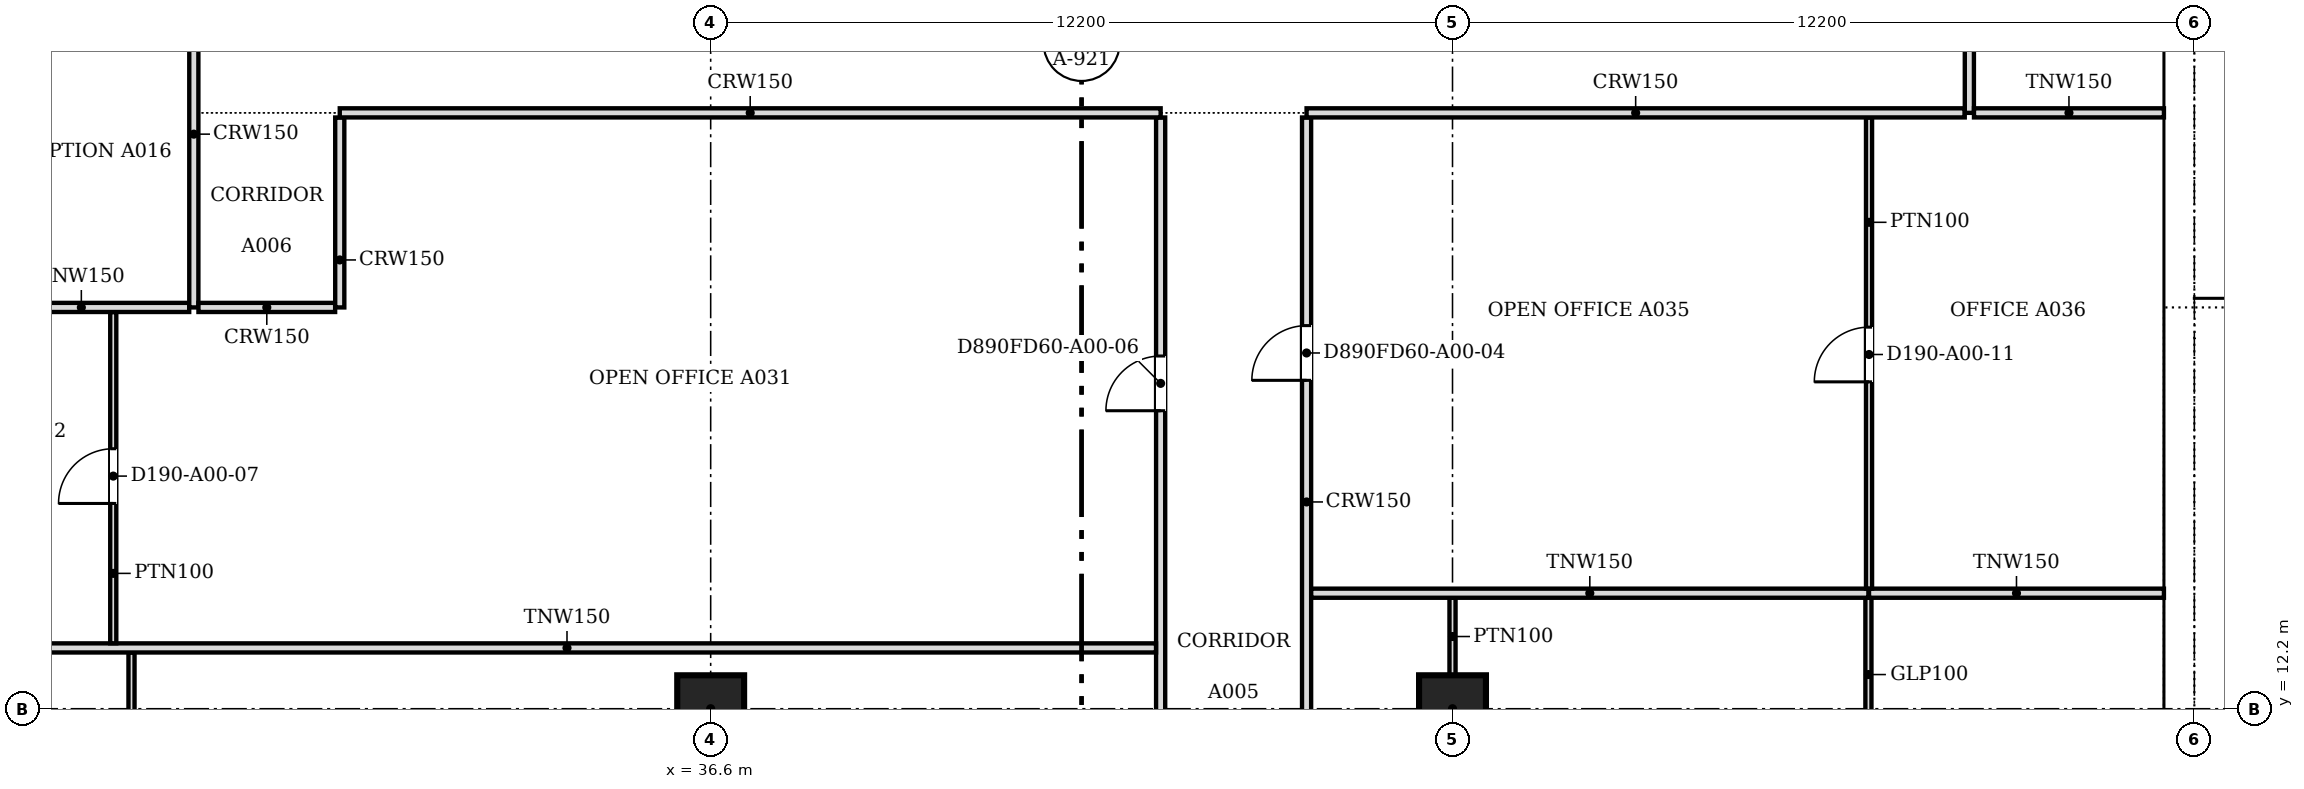
"""IFC4 building model, lengths in metres.
Left out: names, types, materials, properties, quantities, classifications, styles, units other than length and angle.
Written with IfcOpenShell. Run it as: python <this file> out.ifc"""

import sys

from ifc_helpers import new_model, si_unit, direction, frame, frame_2d, origin, origin_2d, place, context, subcontext, project, spatial, polyline, rectangle, outline, extrude, faceted_brep, source, transform, mapped, element, fill, save


model = new_model("IFC4")
c1 = context("Model", 3, precision=1e-05, world=origin(), true_north=direction((0.0, 1.0)))
c2 = subcontext(c1, "Body", "Model", "MODEL_VIEW")
j1 = project(units=[si_unit("LENGTHUNIT", "METRE"), si_unit("PLANEANGLEUNIT", "RADIAN")], contexts=[c1])
p1 = place(None, origin())
s1 = spatial("IfcSite", under=j1, at=p1, CompositionType="ELEMENT")
p2 = place(p1, origin())
s2 = spatial("IfcBuilding", under=s1, at=p2, CompositionType="ELEMENT")
p3 = place(p2, frame((0.0, 0.0, 16.8)))
s3 = spatial("IfcBuildingStorey", under=s2, at=p3, CompositionType="ELEMENT", Elevation=16.8)
for number, where, z_axis, x_axis in (
    (1, (36.6, 12.2, 0.0), (0.0, 0.0, 1.0), (1.0, 0.0, 0.0)),
    (2, (48.8, 12.2, 0.0), (0.0, 0.0, 1.0), (1.0, 0.0, 0.0)),
):
    element("IfcColumn", number, at=place(p3, frame(where, z_axis=z_axis, x_axis=x_axis)), inside=s3, PredefinedType="COLUMN", context=c2, shape_type="SweptSolid", body=[
        extrude(rectangle(XDim=1.1, YDim=1.1, at=origin_2d()), origin(), (0.0, 0.0, 1.0), 4.3),
    ])
m1 = source(origin(), c2, "Body", "SweptSolid", [
    extrude(outline(polyline([(6.1, 0.0), (3.05, 4.5), (0.0, 0.0), (6.1, 0.0)])), frame((0.0, 0.25, 0.0), z_axis=(0.0, -1.0, 0.0), x_axis=(1.0, 0.0, 0.0)), (0.0, 0.0, 1.0), 0.5),
])
p4 = place(p3, frame((60.75, 12.2, 0.0), z_axis=(0.0, 0.0, 1.0), x_axis=(0.0, 1.0, 0.0)))
e3 = element("IfcWall", 3, at=p4, inside=s3, PredefinedType="SOLIDWALL", context=c2, shape_type="MappedRepresentation", body=[
    mapped(m1, transform((0.0, 0.0, 0.0), scale=1.0)),
])
m2 = source(origin(), c2, "Body", "SweptSolid", [
    extrude(outline(polyline([(5.629, 0.25), (3.05, 4.054), (0.471, 0.25), (5.629, 0.25)])), frame((0.0, 0.26, 0.0), z_axis=(0.0, -1.0, 0.0), x_axis=(1.0, 0.0, 0.0)), (0.0, 0.0, 1.0), 0.52),
])
p5 = place(p4, origin())
e4 = element("IfcOpeningElement", 4, at=p5, cuts=e3, PredefinedType="OPENING", context=c2, shape_type="MappedRepresentation", body=[
    mapped(m2, transform((0.0, 0.0, 0.0), scale=1.0)),
])
m3 = source(origin(), c2, "Body", "Brep", [
    faceted_brep([(6.1, -0.25, 0.0), (3.05, -0.25, 4.5), (0.0, -0.25, 0.0), (6.1, -0.25, 0.0), (0.0, 0.25, 0.0), (3.05, 0.25, 4.5), (6.1, 0.25, 0.0), (6.1, 0.25, 0.0)], [[[0, 1, 2, 3]], [[4, 5, 6, 7]], [[6, 5, 1, 0]], [[5, 4, 2, 1]], [[4, 7, 3, 2]], [[3, 7, 6, 0]]]),
])
p6 = place(p3, frame((60.75, 18.3, 0.0), z_axis=(0.0, 0.0, 1.0), x_axis=(0.0, 1.0, 0.0)))
e5 = element("IfcWall", 5, at=p6, inside=s3, PredefinedType="SOLIDWALL", context=c2, shape_type="MappedRepresentation", body=[
    mapped(m3, transform((0.0, 0.0, 0.0), scale=1.0)),
])
p7 = place(p6, origin())
e6 = element("IfcOpeningElement", 6, at=p7, cuts=e5, PredefinedType="OPENING", context=c2, shape_type="MappedRepresentation", body=[
    mapped(m2, transform((0.0, 0.0, 0.0), scale=1.0)),
])
p8 = place(p2, frame((0.0, 0.0, 21.3)))
s4 = spatial("IfcBuildingStorey", under=s2, at=p8, CompositionType="ELEMENT", Elevation=21.3)
m4 = source(origin(), c2, "Body", "SweptSolid", [
    extrude(outline(polyline([(3.05, 0.0), (6.1, 4.5), (3.05, 9.0), (0.0, 4.5), (3.05, 0.0)])), frame((0.0, 0.25, 0.0), z_axis=(0.0, -1.0, 0.0), x_axis=(1.0, 0.0, 0.0)), (0.0, 0.0, 1.0), 0.5),
])
p9 = place(p8, frame((60.75, 9.15, -4.5), z_axis=(0.0, 0.0, 1.0), x_axis=(0.0, 1.0, 0.0)))
e7 = element("IfcWall", 7, at=p9, inside=s4, PredefinedType="SOLIDWALL", context=c2, shape_type="MappedRepresentation", body=[
    mapped(m4, transform((0.0, 0.0, 0.0), scale=1.0)),
])
m5 = source(origin(), c2, "Body", "SweptSolid", [
    extrude(outline(polyline([(3.05, 0.446), (5.798, 4.5), (3.05, 8.554), (0.302, 4.5), (3.05, 0.446)])), frame((0.0, 0.26, 0.0), z_axis=(0.0, -1.0, 0.0), x_axis=(1.0, 0.0, 0.0)), (0.0, 0.0, 1.0), 0.52),
])
p10 = place(p9, origin())
e8 = element("IfcOpeningElement", 8, at=p10, cuts=e7, PredefinedType="OPENING", context=c2, shape_type="MappedRepresentation", body=[
    mapped(m5, transform((0.0, 0.0, 0.0), scale=1.0)),
])
p11 = place(p8, frame((60.75, 15.25, -4.5), z_axis=(0.0, 0.0, 1.0), x_axis=(0.0, 1.0, 0.0)))
e9 = element("IfcWall", 9, at=p11, inside=s4, PredefinedType="SOLIDWALL", context=c2, shape_type="MappedRepresentation", body=[
    mapped(m4, transform((0.0, 0.0, 0.0), scale=1.0)),
])
p12 = place(p11, origin())
e10 = element("IfcOpeningElement", 10, at=p12, cuts=e9, PredefinedType="OPENING", context=c2, shape_type="MappedRepresentation", body=[
    mapped(m5, transform((0.0, 0.0, 0.0), scale=1.0)),
])
m6 = source(origin(), c2, "Body", "Brep", [
    faceted_brep([(3.05, -0.25, 0.0), (6.1, -0.25, 4.5), (6.1, -0.25, 4.5), (3.05, -0.25, 9.0), (0.0, -0.25, 4.5), (0.0, 0.25, 4.5), (3.05, 0.25, 9.0), (6.1, 0.25, 4.5), (6.1, 0.25, 4.5), (3.05, 0.25, 0.0)], [[[0, 1, 2, 3, 4]], [[5, 6, 7, 8, 9]], [[9, 8, 1, 0]], [[7, 6, 3, 2]], [[6, 5, 4, 3]], [[5, 9, 0, 4]], [[1, 8, 7, 2]]]),
])
p13 = place(p8, frame((60.75, 21.35, -4.5), z_axis=(0.0, 0.0, 1.0), x_axis=(0.0, 1.0, 0.0)))
e11 = element("IfcWall", 11, at=p13, inside=s4, PredefinedType="SOLIDWALL", context=c2, shape_type="MappedRepresentation", body=[
    mapped(m6, transform((0.0, 0.0, 0.0), scale=1.0)),
])
p14 = place(p13, origin())
e12 = element("IfcOpeningElement", 12, at=p14, cuts=e11, PredefinedType="OPENING", context=c2, shape_type="MappedRepresentation", body=[
    mapped(m5, transform((0.0, 0.0, 0.0), scale=1.0)),
])
p15 = place(p3, frame((44.0, 0.5, 0.0), z_axis=(0.0, 0.0, 1.0), x_axis=(0.0, 1.0, 0.0)))
e13 = element("IfcWall", 13, at=p15, inside=s3, PredefinedType="PARTITIONING", context=c2, shape_type="SweptSolid", body=[
    extrude(rectangle(XDim=21.424, YDim=0.15, at=frame_2d((10.712, 0.0))), origin(), (0.0, 0.0, 1.0), 3.415),
])
m7 = source(origin(), c2, "Body", "SweptSolid", [
    extrude(rectangle(XDim=0.9, YDim=2.1, at=frame_2d((0.45, 1.05))), frame((0.0, 0.085, 0.0), z_axis=(0.0, -1.0, 0.0), x_axis=(1.0, 0.0, 0.0)), (0.0, 0.0, 1.0), 0.17),
])
p16 = place(p15, frame((16.601, 0.0, 0.0)))
e14 = element("IfcOpeningElement", 14, at=p16, cuts=e13, PredefinedType="OPENING", context=c2, shape_type="MappedRepresentation", body=[
    mapped(m7, transform((0.0, 0.0, 0.0), scale=1.0)),
])
p17 = place(p15, frame((7.7, 0.0, 0.0)))
e15 = element("IfcOpeningElement", 15, at=p17, cuts=e13, PredefinedType="OPENING", context=c2, shape_type="MappedRepresentation", body=[
    mapped(m7, transform((0.0, 0.0, 0.0), scale=1.0)),
])
p18 = place(p3, frame((27.075, 4.2, 0.0), z_axis=(0.0, 0.0, 1.0), x_axis=(0.0, 1.0, 0.0)))
e16 = element("IfcWall", 16, at=p18, inside=s3, PredefinedType="PARTITIONING", context=c2, shape_type="SweptSolid", body=[
    extrude(rectangle(XDim=8.924, YDim=0.1, at=frame_2d((4.462, 0.0))), origin(), (0.0, 0.0, 1.0), 3.415),
])
m8 = source(origin(), c2, "Body", "SweptSolid", [
    extrude(rectangle(XDim=0.9, YDim=2.1, at=frame_2d((0.45, 1.05))), frame((0.0, 0.06, 0.0), z_axis=(0.0, -1.0, 0.0), x_axis=(1.0, 0.0, 0.0)), (0.0, 0.0, 1.0), 0.12),
])
p19 = place(p18, frame((6.148, 0.0, 0.0)))
e17 = element("IfcOpeningElement", 17, at=p19, cuts=e16, PredefinedType="OPENING", context=c2, shape_type="MappedRepresentation", body=[
    mapped(m8, transform((0.0, 0.0, 0.0), scale=1.0)),
])
p20 = place(p18, frame((1.7, 0.0, 0.0)))
e18 = element("IfcOpeningElement", 18, at=p20, cuts=e16, PredefinedType="OPENING", context=c2, shape_type="MappedRepresentation", body=[
    mapped(m8, transform((0.0, 0.0, 0.0), scale=1.0)),
])
p21 = place(p3, frame((46.4, 21.924, 0.0), z_axis=(0.0, 0.0, 1.0), x_axis=(0.0, -1.0, 0.0)))
e19 = element("IfcWall", 19, at=p21, inside=s3, PredefinedType="PARTITIONING", context=c2, shape_type="SweptSolid", body=[
    extrude(rectangle(XDim=17.724, YDim=0.15, at=frame_2d((8.862, 0.0))), origin(), (0.0, 0.0, 1.0), 3.415),
])
p22 = place(p21, frame((3.423, 0.0, 0.0)))
e20 = element("IfcOpeningElement", 20, at=p22, cuts=e19, PredefinedType="OPENING", context=c2, shape_type="MappedRepresentation", body=[
    mapped(m7, transform((0.0, 0.0, 0.0), scale=1.0)),
])
p23 = place(p21, frame((12.324, 0.0, 0.0)))
e21 = element("IfcOpeningElement", 21, at=p23, cuts=e19, PredefinedType="OPENING", context=c2, shape_type="MappedRepresentation", body=[
    mapped(m7, transform((0.0, 0.0, 0.0), scale=1.0)),
])
p24 = place(p3, frame((55.64, 14.024, 0.0), z_axis=(0.0, 0.0, 1.0), x_axis=(0.0, -1.0, 0.0)))
e22 = element("IfcWall", 22, at=p24, inside=s3, PredefinedType="PARTITIONING", context=c2, shape_type="SweptSolid", body=[
    extrude(rectangle(XDim=5.924, YDim=0.1, at=frame_2d((2.962, 0.0))), origin(), (0.0, 0.0, 1.0), 3.415),
])
p25 = place(p24, frame((2.524, 0.0, 0.0)))
e23 = element("IfcOpeningElement", 23, at=p25, cuts=e22, PredefinedType="OPENING", context=c2, shape_type="MappedRepresentation", body=[
    mapped(m8, transform((0.0, 0.0, 0.0), scale=1.0)),
])
p26 = place(p3, frame((48.8, 12.75, 0.0), z_axis=(0.0, 0.0, 1.0), x_axis=(0.0, 1.0, 0.0)))
e24 = element("IfcWall", 24, at=p26, inside=s3, PredefinedType="PARTITIONING", context=c2, shape_type="SweptSolid", body=[
    extrude(rectangle(XDim=1.275, YDim=0.1, at=frame_2d((0.637, 0.0))), origin(), (0.0, 0.0, 1.0), 3.415),
])
p27 = place(p3, frame((24.55, 13.2, 0.0), z_axis=(0.0, 0.0, 1.0), x_axis=(1.0, 0.0, 0.0)))
e25 = element("IfcWall", 25, at=p27, inside=s3, PredefinedType="PARTITIONING", context=c2, shape_type="SweptSolid", body=[
    extrude(rectangle(XDim=19.374, YDim=0.15, at=frame_2d((9.687, 0.0))), origin(), (0.0, 0.0, 1.0), 3.415),
])
p28 = place(p3, frame((26.775, 13.276, 0.0), z_axis=(0.0, 0.0, 1.0), x_axis=(0.0, 1.0, 0.0)))
e26 = element("IfcWall", 26, at=p28, inside=s3, PredefinedType="PARTITIONING", context=c2, shape_type="SweptSolid", body=[
    extrude(rectangle(XDim=5.448, YDim=0.1, at=frame_2d((2.724, 0.0))), origin(), (0.0, 0.0, 1.0), 3.415),
])
p29 = place(p28, frame((2.3, 0.0, 0.0)))
e27 = element("IfcOpeningElement", 27, at=p29, cuts=e26, PredefinedType="OPENING", context=c2, shape_type="MappedRepresentation", body=[
    mapped(m8, transform((0.0, 0.0, 0.0), scale=1.0)),
])
p30 = place(p3, frame((46.476, 14.1, 0.0), z_axis=(0.0, 0.0, 1.0), x_axis=(1.0, 0.0, 0.0)))
e28 = element("IfcWall", 28, at=p30, inside=s3, PredefinedType="PARTITIONING", context=c2, shape_type="SweptSolid", body=[
    extrude(rectangle(XDim=9.164, YDim=0.15, at=frame_2d((4.582, 0.0))), origin(), (0.0, 0.0, 1.0), 3.415),
])
p31 = place(p3, frame((55.65, 14.1, 0.0), z_axis=(0.0, 0.0, 1.0), x_axis=(1.0, 0.0, 0.0)))
e29 = element("IfcWall", 29, at=p31, inside=s3, PredefinedType="PARTITIONING", context=c2, shape_type="SweptSolid", body=[
    extrude(rectangle(XDim=4.85, YDim=0.15, at=frame_2d((2.425, 0.0))), origin(), (0.0, 0.0, 1.0), 3.415),
])
p32 = place(p3, frame((55.65, 21.924, 0.0), z_axis=(0.0, 0.0, 1.0), x_axis=(0.0, -1.0, 0.0)))
e30 = element("IfcWall", 30, at=p32, inside=s3, PredefinedType="PARTITIONING", context=c2, shape_type="SweptSolid", body=[
    extrude(rectangle(XDim=7.748, YDim=0.1, at=frame_2d((3.874, 0.0))), origin(), (0.0, 0.0, 1.0), 3.415),
])
p33 = place(p32, frame((3.448, 0.0, 0.0)))
e31 = element("IfcOpeningElement", 31, at=p33, cuts=e30, PredefinedType="OPENING", context=c2, shape_type="MappedRepresentation", body=[
    mapped(m8, transform((0.0, 0.0, 0.0), scale=1.0)),
])
p34 = place(p3, frame((24.476, 18.8, 0.0), z_axis=(0.0, 0.0, 1.0), x_axis=(1.0, 0.0, 0.0)))
e32 = element("IfcWall", 32, at=p34, inside=s3, PredefinedType="PARTITIONING", context=c2, shape_type="SweptSolid", body=[
    extrude(rectangle(XDim=3.548, YDim=0.15, at=frame_2d((1.774, 0.0))), origin(), (0.0, 0.0, 1.0), 3.415),
])
p35 = place(p3, frame((28.1, 18.8, 0.0), z_axis=(0.0, 0.0, 1.0), x_axis=(0.0, 1.0, 0.0)))
e33 = element("IfcWall", 33, at=p35, inside=s3, PredefinedType="PARTITIONING", context=c2, shape_type="SweptSolid", body=[
    extrude(rectangle(XDim=26.424, YDim=0.15, at=frame_2d((13.212, 0.0))), origin(), (0.0, 0.0, 1.0), 3.415),
])
p36 = place(p35, frame((23.451, 0.0, 0.0)))
e34 = element("IfcOpeningElement", 34, at=p36, cuts=e33, PredefinedType="OPENING", context=c2, shape_type="MappedRepresentation", body=[
    mapped(m7, transform((0.0, 0.0, 0.0), scale=1.0)),
])
m9 = source(origin(), c2, "Body", "SweptSolid", [
    extrude(rectangle(XDim=1.0, YDim=2.1, at=frame_2d((0.5, 1.05))), frame((0.0, 0.085, 0.0), z_axis=(0.0, -1.0, 0.0), x_axis=(1.0, 0.0, 0.0)), (0.0, 0.0, 1.0), 0.17),
])
p37 = place(p35, frame((5.7, 0.0, 0.0)))
e35 = element("IfcOpeningElement", 35, at=p37, cuts=e33, PredefinedType="OPENING", context=c2, shape_type="MappedRepresentation", body=[
    mapped(m9, transform((0.0, 0.0, 0.0), scale=1.0)),
])
p38 = place(p35, frame((11.65, 0.0, 0.0)))
e36 = element("IfcOpeningElement", 36, at=p38, cuts=e33, PredefinedType="OPENING", context=c2, shape_type="MappedRepresentation", body=[
    mapped(m9, transform((0.0, 0.0, 0.0), scale=1.0)),
])
p39 = place(p35, frame((17.75, 0.0, 0.0)))
e37 = element("IfcOpeningElement", 37, at=p39, cuts=e33, PredefinedType="OPENING", context=c2, shape_type="MappedRepresentation", body=[
    mapped(m9, transform((0.0, 0.0, 0.0), scale=1.0)),
])
p40 = place(p3, frame((28.176, 18.8, 0.0), z_axis=(0.0, 0.0, 1.0), x_axis=(1.0, 0.0, 0.0)))
e38 = element("IfcWall", 38, at=p40, inside=s3, PredefinedType="PARTITIONING", context=c2, shape_type="SweptSolid", body=[
    extrude(rectangle(XDim=2.248, YDim=0.15, at=frame_2d((1.124, 0.0))), origin(), (0.0, 0.0, 1.0), 3.415),
])
p41 = place(p3, frame((30.5, 18.8, 0.0), z_axis=(0.0, 0.0, 1.0), x_axis=(0.0, 1.0, 0.0)))
e39 = element("IfcWall", 39, at=p41, inside=s3, PredefinedType="PARTITIONING", context=c2, shape_type="SweptSolid", body=[
    extrude(rectangle(XDim=3.124, YDim=0.15, at=frame_2d((1.562, 0.0))), origin(), (0.0, 0.0, 1.0), 3.415),
])
p42 = place(p3, frame((30.5, 22.0, 0.0), z_axis=(0.0, 0.0, 1.0), x_axis=(1.0, 0.0, 0.0)))
e40 = element("IfcWall", 40, at=p42, inside=s3, PredefinedType="PARTITIONING", context=c2, shape_type="SweptSolid", body=[
    extrude(rectangle(XDim=13.5, YDim=0.15, at=frame_2d((6.75, 0.0))), origin(), (0.0, 0.0, 1.0), 3.415),
])
p43 = place(p3, frame((46.4, 22.0, 0.0), z_axis=(0.0, 0.0, 1.0), x_axis=(1.0, 0.0, 0.0)))
e41 = element("IfcWall", 41, at=p43, inside=s3, PredefinedType="PARTITIONING", context=c2, shape_type="SweptSolid", body=[
    extrude(rectangle(XDim=10.824, YDim=0.15, at=frame_2d((5.412, 0.0))), origin(), (0.0, 0.0, 1.0), 3.415),
])
p44 = place(p3, frame((57.3, 30.6, 0.0), z_axis=(0.0, 0.0, 1.0), x_axis=(0.0, -1.0, 0.0)))
e42 = element("IfcWall", 42, at=p44, inside=s3, PredefinedType="PARTITIONING", context=c2, shape_type="SweptSolid", body=[
    extrude(rectangle(XDim=8.6, YDim=0.15, at=frame_2d((4.3, 0.0))), origin(), (0.0, 0.0, 1.0), 3.415),
])
p45 = place(p44, frame((3.9, 0.0, 0.0)))
e43 = element("IfcOpeningElement", 43, at=p45, cuts=e42, PredefinedType="OPENING", context=c2, shape_type="MappedRepresentation", body=[
    mapped(m7, transform((0.0, 0.0, 0.0), scale=1.0)),
])
p46 = place(p3, frame((57.376, 22.0, 0.0), z_axis=(0.0, 0.0, 1.0), x_axis=(1.0, 0.0, 0.0)))
e44 = element("IfcWall", 44, at=p46, inside=s3, PredefinedType="PARTITIONING", context=c2, shape_type="SweptSolid", body=[
    extrude(rectangle(XDim=3.124, YDim=0.15, at=frame_2d((1.562, 0.0))), origin(), (0.0, 0.0, 1.0), 3.415),
])
m10 = source(origin(), c2, "Body", "SweptSolid", [
    extrude(rectangle(XDim=0.9, YDim=2.1, at=frame_2d((0.45, 1.05))), frame((0.0, 0.025, 0.0), z_axis=(0.0, -1.0, 0.0), x_axis=(1.0, 0.0, 0.0)), (0.0, 0.0, 1.0), 0.05),
])
p47 = place(p29, origin())
e45 = element("IfcDoor", 45, at=p47, inside=s3, OperationType="SINGLE_SWING_LEFT", PredefinedType="DOOR", context=c2, shape_type="MappedRepresentation", body=[
    mapped(m10, transform((0.0, 0.0, 0.0), scale=1.0)),
])
fill(e27, e45)
p48 = place(p33, origin())
e46 = element("IfcDoor", 46, at=p48, inside=s3, OperationType="SINGLE_SWING_RIGHT", PredefinedType="DOOR", context=c2, shape_type="MappedRepresentation", body=[
    mapped(m10, transform((0.0, 0.0, 0.0), scale=1.0)),
])
fill(e31, e46)
p49 = place(p22, origin())
e47 = element("IfcDoor", 47, at=p49, inside=s3, OperationType="SINGLE_SWING_RIGHT", PredefinedType="DOOR", context=c2, shape_type="MappedRepresentation", body=[
    mapped(m10, transform((0.0, 0.0, 0.0), scale=1.0)),
])
fill(e20, e47)
p50 = place(p16, origin())
e48 = element("IfcDoor", 48, at=p50, inside=s3, OperationType="SINGLE_SWING_LEFT", PredefinedType="DOOR", context=c2, shape_type="MappedRepresentation", body=[
    mapped(m10, transform((0.0, 0.0, 0.0), scale=1.0)),
])
fill(e14, e48)
save(model, sys.argv[1])
